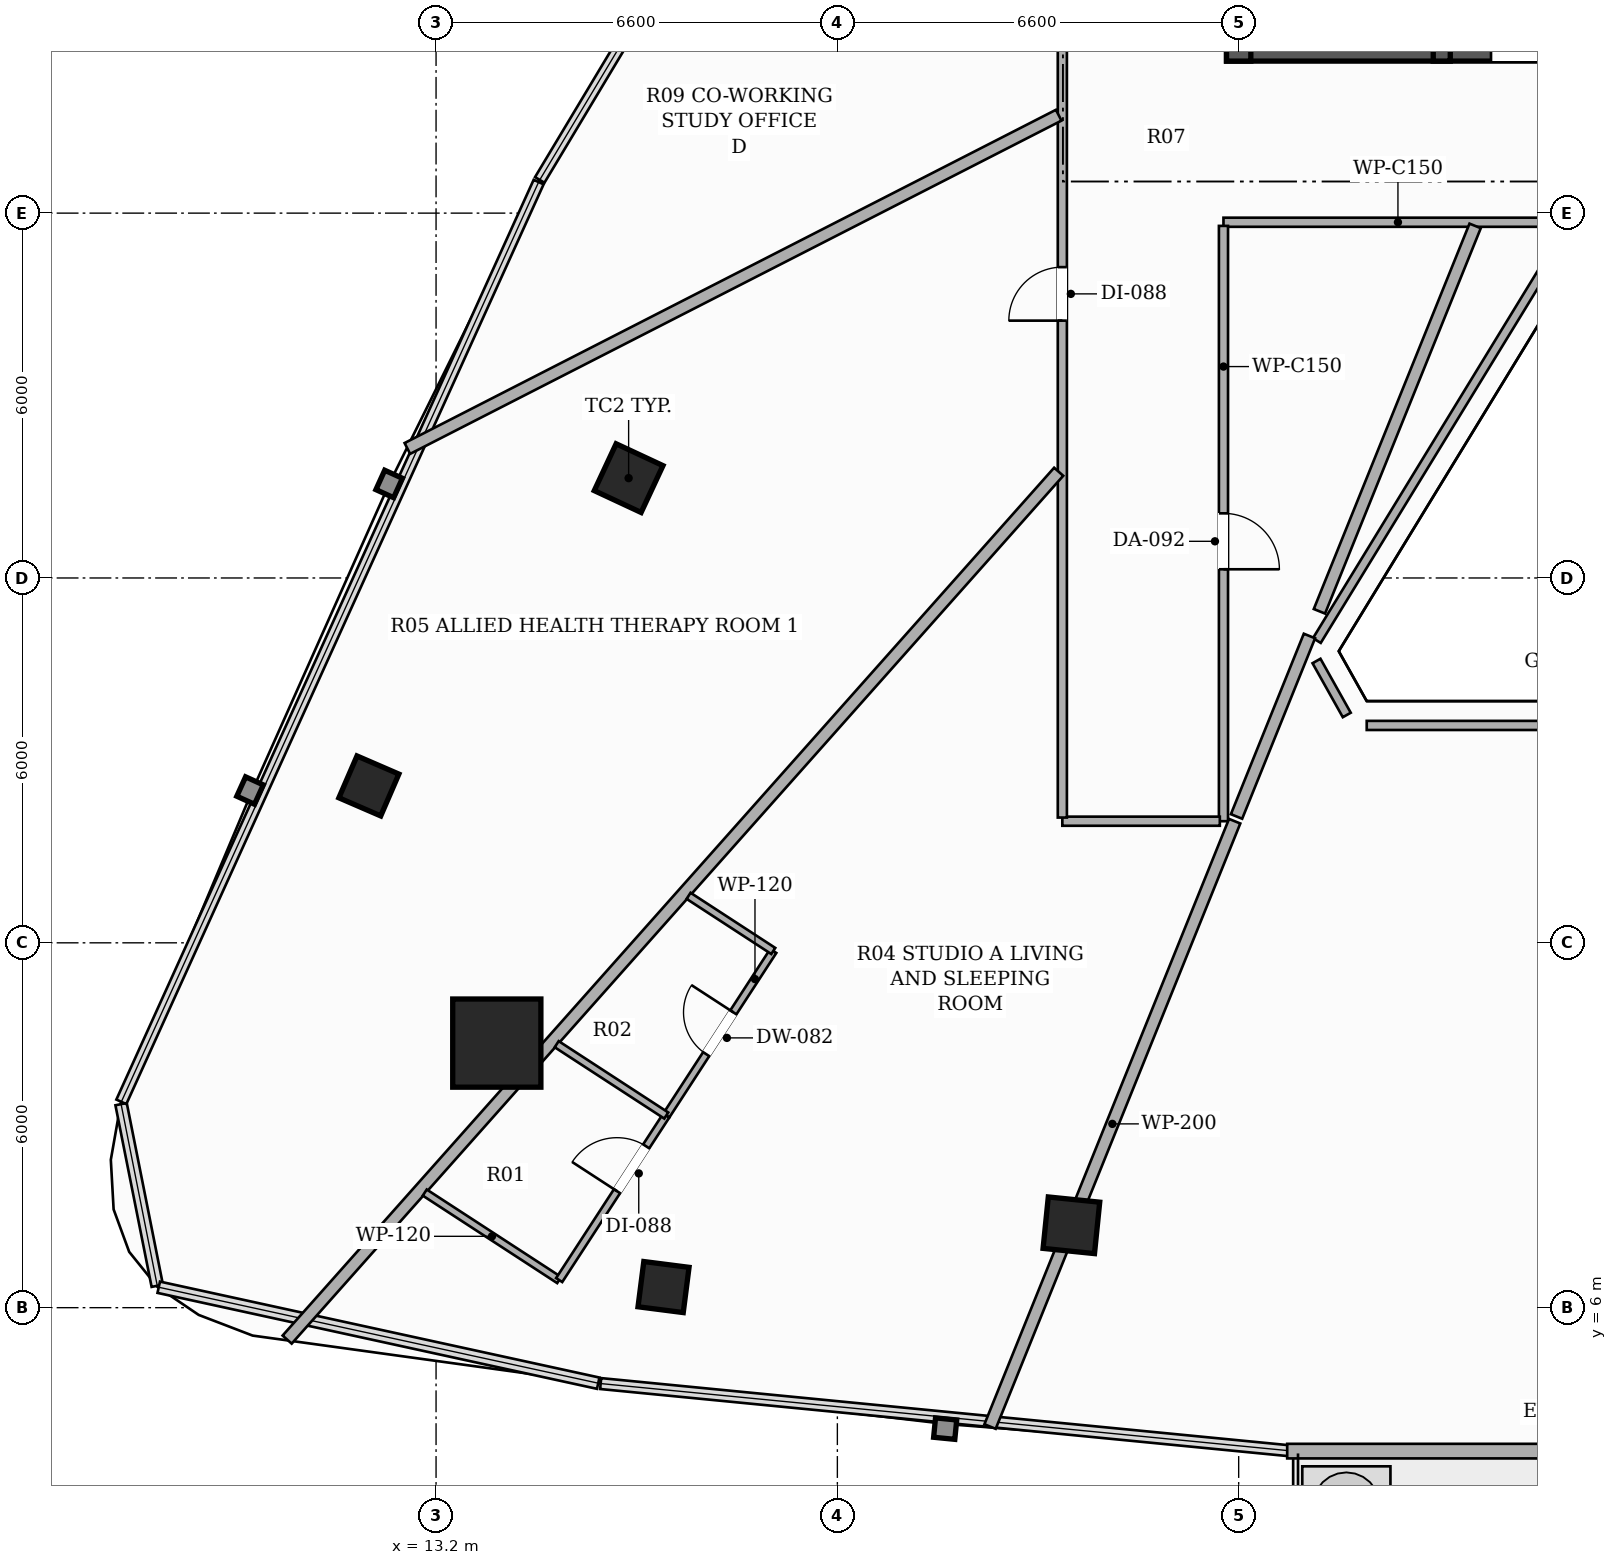
"""IFC4 building model, lengths in metres.
Left out: names, types, materials, properties, quantities, classifications, styles, units other than length and angle.
Written with IfcOpenShell. Run it as: python <this file> out.ifc"""

import sys

from ifc_helpers import new_model, si_unit, direction, frame, frame_2d, origin, origin_2d, place, context, subcontext, project, spatial, rectangle, hollow_rectangle, extrude, element, fill, save


model = new_model("IFC4")
c1 = context("Model", 3, precision=1e-05, world=origin(), true_north=direction((0.0, 1.0)))
c2 = subcontext(c1, "Body", "Model", "MODEL_VIEW")
j1 = project(units=[si_unit("LENGTHUNIT", "METRE"), si_unit("PLANEANGLEUNIT", "RADIAN")], contexts=[c1])
p1 = place(None, origin())
s1 = spatial("IfcSite", under=j1, at=p1, CompositionType="ELEMENT")
p2 = place(p1, origin())
s2 = spatial("IfcBuilding", under=s1, at=p2, CompositionType="ELEMENT")
p3 = place(p2, frame((0.0, 0.0, 153.95)))
s3 = spatial("IfcBuildingStorey", under=s2, at=p3, CompositionType="ELEMENT", Elevation=153.95)
p4 = place(p3, frame((26.2, 26.7, 0.0), z_axis=(0.0, 0.0, 1.0), x_axis=(1.0, 0.0, 0.0)))
e1 = element("IfcWall", 1, at=p4, inside=s3, PredefinedType="SHEAR", context=c2, shape_type="SweptSolid", body=[
    extrude(rectangle(XDim=13.6, YDim=0.4, at=frame_2d((6.8, 0.0))), origin(), (0.0, 0.0, 1.0), 3.3),
])
p5 = place(p4, frame((4.35, 0.0, 0.0)))
e2 = element("IfcOpeningElement", 2, at=p5, cuts=e1, PredefinedType="OPENING", context=c2, shape_type="SweptSolid", body=[
    extrude(rectangle(XDim=1.05, YDim=2.15, at=frame_2d((0.525, 1.075))), frame((0.0, 0.21, 0.0), z_axis=(0.0, -1.0, 0.0), x_axis=(1.0, 0.0, 0.0)), (0.0, 0.0, 1.0), 0.42),
])
p6 = place(p4, frame((8.3, 0.0, 0.0)))
e3 = element("IfcOpeningElement", 3, at=p6, cuts=e1, PredefinedType="OPENING", context=c2, shape_type="SweptSolid", body=[
    extrude(rectangle(XDim=1.05, YDim=2.15, at=frame_2d((0.525, 1.075))), frame((0.0, 0.21, 0.0), z_axis=(0.0, -1.0, 0.0), x_axis=(1.0, 0.0, 0.0)), (0.0, 0.0, 1.0), 0.42),
])
p7 = place(p3, frame((26.4, 26.5, 0.0), z_axis=(0.0, 0.0, 1.0), x_axis=(0.0, 1.0, 0.0)))
e4 = element("IfcWall", 4, at=p7, inside=s3, PredefinedType="SHEAR", context=c2, shape_type="SweptSolid", body=[
    extrude(rectangle(XDim=7.6, YDim=0.4, at=frame_2d((3.8, 0.0))), origin(), (0.0, 0.0, 1.0), 3.3),
])
p8 = place(p3, frame((29.74, 26.5, 0.0), z_axis=(0.0, 0.0, 1.0), x_axis=(0.0, 1.0, 0.0)))
e5 = element("IfcWall", 5, at=p8, inside=s3, PredefinedType="SHEAR", context=c2, shape_type="SweptSolid", body=[
    extrude(rectangle(XDim=8.15, YDim=0.28, at=frame_2d((4.075, 0.0))), origin(), (0.0, 0.0, 1.0), 3.3),
])
p9 = place(p8, frame((0.6, 0.0, 0.0)))
e6 = element("IfcOpeningElement", 6, at=p9, cuts=e5, PredefinedType="OPENING", context=c2, shape_type="SweptSolid", body=[
    extrude(rectangle(XDim=1.05, YDim=2.15, at=frame_2d((0.525, 1.075))), frame((0.0, 0.15, 0.0), z_axis=(0.0, -1.0, 0.0), x_axis=(1.0, 0.0, 0.0)), (0.0, 0.0, 1.0), 0.3),
])
p10 = place(p3, frame((14.199, 10.351, 0.0), z_axis=(0.0, 0.0, 1.0), x_axis=(1.0, 0.0, 0.0)))
e7 = element("IfcColumn", 7, at=p10, inside=s3, PredefinedType="COLUMN", context=c2, shape_type="SweptSolid", body=[
    extrude(hollow_rectangle(XDim=1.45, YDim=1.45, WallThickness=0.045, at=origin_2d()), origin(), (0.0, 0.0, 1.0), 3.3),
])
for number, where, z_axis, x_axis in (
    (8, (16.367, 19.642, 0.0), (0.0, 0.0, 1.0), (0.423, 0.906, 0.0)),
    (9, (23.649, 7.355, 0.0), (0.0, 0.0, 1.0), (-0.995, 0.101, 0.0)),
):
    element("IfcColumn", number, at=place(p3, frame(where, z_axis=z_axis, x_axis=x_axis)), inside=s3, PredefinedType="COLUMN", context=c2, shape_type="SweptSolid", body=[
        extrude(hollow_rectangle(XDim=0.85, YDim=0.85, WallThickness=0.028, at=origin_2d()), origin(), (0.0, 0.0, 1.0), 3.3),
    ])
for number, where, z_axis, x_axis in (
    (10, (12.095, 14.58, 0.0), (0.0, 0.0, 1.0), (0.397, 0.918, 0.0)),
    (11, (16.941, 6.339, 0.0), (0.0, 0.0, 1.0), (-0.992, 0.127, 0.0)),
):
    element("IfcColumn", number, at=place(p3, frame(where, z_axis=z_axis, x_axis=x_axis)), inside=s3, PredefinedType="COLUMN", context=c2, shape_type="SweptSolid", body=[
        extrude(hollow_rectangle(XDim=0.75, YDim=0.75, WallThickness=0.025, at=origin_2d()), origin(), (0.0, 0.0, 1.0), 3.3),
    ])
p11 = place(p3, frame((27.198, 3.641, 0.0), z_axis=(0.0, 0.0, 1.0), x_axis=(1.0, 0.0, 0.0)))
e12 = element("IfcWall", 12, at=p11, inside=s3, PredefinedType="SOLIDWALL", context=c2, shape_type="SweptSolid", body=[
    extrude(rectangle(XDim=11.604, YDim=0.24, at=frame_2d((5.802, 0.0))), origin(), (0.0, 0.0, 1.0), 2.624),
])
p12 = place(p11, frame((9.107, 0.0, 0.0)))
e13 = element("IfcOpeningElement", 13, at=p12, cuts=e12, PredefinedType="OPENING", context=c2, shape_type="SweptSolid", body=[
    extrude(rectangle(XDim=1.8, YDim=2.2, at=frame_2d((0.9, 1.1))), frame((0.0, 0.13, 0.0), z_axis=(0.0, -1.0, 0.0), x_axis=(1.0, 0.0, 0.0)), (0.0, 0.0, 1.0), 0.26),
])
p13 = place(p3, frame((31.889, 23.85, 0.0), z_axis=(0.0, 0.0, 1.0), x_axis=(-1.0, 0.0, 0.0)))
e14 = element("IfcWall", 14, at=p13, inside=s3, PredefinedType="PARTITIONING", context=c2, shape_type="SweptSolid", body=[
    extrude(rectangle(XDim=5.739, YDim=0.15, at=frame_2d((2.87, 0.0))), origin(), (0.0, 0.0, 1.0), 2.721),
])
p14 = place(p3, frame((26.15, 23.79, 0.0), z_axis=(0.0, 0.0, 1.0), x_axis=(0.0, -1.0, 0.0)))
e15 = element("IfcWall", 15, at=p14, inside=s3, PredefinedType="PARTITIONING", context=c2, shape_type="SweptSolid", body=[
    extrude(rectangle(XDim=9.79, YDim=0.15, at=frame_2d((4.895, 0.0))), origin(), (0.0, 0.0, 1.0), 2.721),
])
p15 = place(p14, frame((4.727, 0.0, 0.0)))
e16 = element("IfcOpeningElement", 16, at=p15, cuts=e15, PredefinedType="OPENING", context=c2, shape_type="SweptSolid", body=[
    extrude(rectangle(XDim=0.92, YDim=2.15, at=frame_2d((0.46, 1.075))), frame((0.0, 0.085, 0.0), z_axis=(0.0, -1.0, 0.0), x_axis=(1.0, 0.0, 0.0)), (0.0, 0.0, 1.0), 0.17),
])
p16 = place(p3, frame((26.09, 14.0, 0.0), z_axis=(0.0, 0.0, 1.0), x_axis=(-1.0, 0.0, 0.0)))
e17 = element("IfcWall", 17, at=p16, inside=s3, PredefinedType="PARTITIONING", context=c2, shape_type="SweptSolid", body=[
    extrude(rectangle(XDim=2.59, YDim=0.15, at=frame_2d((1.295, 0.0))), origin(), (0.0, 0.0, 1.0), 2.721),
])
p17 = place(p3, frame((23.5, 14.06, 0.0), z_axis=(0.0, 0.0, 1.0), x_axis=(0.0, 1.0, 0.0)))
e18 = element("IfcWall", 18, at=p17, inside=s3, PredefinedType="PARTITIONING", context=c2, shape_type="SweptSolid", body=[
    extrude(rectangle(XDim=22.84, YDim=0.15, at=frame_2d((11.42, 0.0))), origin(), (0.0, 0.0, 1.0), 2.413),
])
p18 = place(p17, frame((8.172, 0.0, 0.0)))
e19 = element("IfcOpeningElement", 19, at=p18, cuts=e18, PredefinedType="OPENING", context=c2, shape_type="SweptSolid", body=[
    extrude(rectangle(XDim=0.88, YDim=2.1, at=frame_2d((0.44, 1.05))), frame((0.0, 0.085, 0.0), z_axis=(0.0, -1.0, 0.0), x_axis=(1.0, 0.0, 0.0)), (0.0, 0.0, 1.0), 0.17),
])
p19 = place(p17, frame((20.969, 0.0, 0.0)))
e20 = element("IfcOpeningElement", 20, at=p19, cuts=e18, PredefinedType="OPENING", context=c2, shape_type="SweptSolid", body=[
    extrude(rectangle(XDim=0.88, YDim=2.1, at=frame_2d((0.44, 1.05))), frame((0.0, 0.085, 0.0), z_axis=(0.0, -1.0, 0.0), x_axis=(1.0, 0.0, 0.0)), (0.0, 0.0, 1.0), 0.17),
])
p20 = place(p17, frame((15.484, 0.0, 0.0)))
e21 = element("IfcOpeningElement", 21, at=p20, cuts=e18, PredefinedType="OPENING", context=c2, shape_type="SweptSolid", body=[
    extrude(rectangle(XDim=0.88, YDim=2.1, at=frame_2d((0.44, 1.05))), frame((0.0, 0.085, 0.0), z_axis=(0.0, -1.0, 0.0), x_axis=(1.0, 0.0, 0.0)), (0.0, 0.0, 1.0), 0.17),
])
p21 = place(p3, frame((37.493, 15.575, 0.0), z_axis=(0.0, 0.0, 1.0), x_axis=(-1.0, 0.0, 0.0)))
e22 = element("IfcWall", 22, at=p21, inside=s3, PredefinedType="PARTITIONING", context=c2, shape_type="SweptSolid", body=[
    extrude(rectangle(XDim=8.987, YDim=0.15, at=frame_2d((4.493, 0.0))), origin(), (0.0, 0.0, 1.0), 2.721),
])
p22 = place(p3, frame((28.178, 15.747, 0.0), z_axis=(0.0, 0.0, 1.0), x_axis=(-0.489202035948, 0.872170492521, 0.0)))
e23 = element("IfcWall", 23, at=p22, inside=s3, PredefinedType="PARTITIONING", context=c2, shape_type="SweptSolid", body=[
    extrude(rectangle(XDim=1.018, YDim=0.15, at=frame_2d((0.509, 0.0))), origin(), (0.0, 0.0, 1.0), 3.06),
])
p23 = place(p3, frame((27.686, 16.971, 0.0), z_axis=(0.0, 0.0, 1.0), x_axis=(0.521873666917, 0.853022787374, 0.0)))
e24 = element("IfcWall", 24, at=p23, inside=s3, PredefinedType="PARTITIONING", context=c2, shape_type="SweptSolid", body=[
    extrude(rectangle(XDim=7.994, YDim=0.15, at=frame_2d((3.997, 0.0))), origin(), (0.0, 0.0, 1.0), 2.721),
])
p24 = place(p3, frame((22.311, 4.045, 0.0), z_axis=(0.0, 0.0, 1.0), x_axis=(0.374673572515, 0.92715679044, 0.0)))
e25 = element("IfcWall", 25, at=p24, inside=s3, PredefinedType="PARTITIONING", context=c2, shape_type="SweptSolid", body=[
    extrude(rectangle(XDim=10.737, YDim=0.2, at=frame_2d((5.369, 0.0))), origin(), (0.0, 0.0, 1.0), 2.413),
])
p25 = place(p3, frame((26.365, 14.078, 0.0), z_axis=(0.0, 0.0, 1.0), x_axis=(0.374557626207, 0.927203637099, 0.0)))
e26 = element("IfcWall", 26, at=p25, inside=s3, PredefinedType="PARTITIONING", context=c2, shape_type="SweptSolid", body=[
    extrude(rectangle(XDim=3.201, YDim=0.2, at=frame_2d((1.601, 0.0))), origin(), (0.0, 0.0, 1.0), 3.06),
])
p26 = place(p3, frame((27.728, 17.452, 0.0), z_axis=(0.0, 0.0, 1.0), x_axis=(0.374639602714, 0.927170517261, 0.0)))
e27 = element("IfcWall", 27, at=p26, inside=s3, PredefinedType="PARTITIONING", context=c2, shape_type="SweptSolid", body=[
    extrude(rectangle(XDim=6.836, YDim=0.2, at=frame_2d((3.418, 0.0))), origin(), (0.0, 0.0, 1.0), 2.721),
])
p27 = place(p3, frame((23.44, 19.747, 0.0), z_axis=(0.0, 0.0, 1.0), x_axis=(-0.664444771995, -0.747337370248, 0.0)))
e28 = element("IfcWall", 28, at=p27, inside=s3, PredefinedType="PARTITIONING", context=c2, shape_type="SweptSolid", body=[
    extrude(rectangle(XDim=19.097, YDim=0.2, at=frame_2d((9.549, 0.0))), origin(), (0.0, 0.0, 1.0), 2.413),
])
p28 = place(p3, frame((12.728, 20.13, 0.0), z_axis=(0.0, 0.0, 1.0), x_axis=(0.890257920911, 0.455456731486, 0.0)))
e29 = element("IfcWall", 29, at=p28, inside=s3, PredefinedType="PARTITIONING", context=c2, shape_type="SweptSolid", body=[
    extrude(rectangle(XDim=12.032, YDim=0.2, at=frame_2d((6.016, 0.0))), origin(), (0.0, 0.0, 1.0), 2.413),
])
p29 = place(p3, frame((16.986, 9.16, 0.0), z_axis=(0.0, 0.0, 1.0), x_axis=(0.545222266406, 0.8382915246, 0.0)))
e30 = element("IfcWall", 30, at=p29, inside=s3, PredefinedType="PARTITIONING", context=c2, shape_type="SweptSolid", body=[
    extrude(rectangle(XDim=3.228, YDim=0.12, at=frame_2d((1.614, 0.0))), origin(), (0.0, 0.0, 1.0), 3.06),
])
p30 = place(p29, frame((1.204, 0.0, 0.0)))
e31 = element("IfcOpeningElement", 31, at=p30, cuts=e30, PredefinedType="OPENING", context=c2, shape_type="SweptSolid", body=[
    extrude(rectangle(XDim=0.82, YDim=2.1, at=frame_2d((0.41, 1.05))), frame((0.0, 0.07, 0.0), z_axis=(0.0, -1.0, 0.0), x_axis=(1.0, 0.0, 0.0)), (0.0, 0.0, 1.0), 0.14),
])
p31 = place(p3, frame((18.746, 11.866, 0.0), z_axis=(0.0, 0.0, 1.0), x_axis=(-0.838034005253, 0.545618003771, 0.0)))
e32 = element("IfcWall", 32, at=p31, inside=s3, PredefinedType="PARTITIONING", context=c2, shape_type="SweptSolid", body=[
    extrude(rectangle(XDim=1.662, YDim=0.12, at=frame_2d((0.831, 0.0))), origin(), (0.0, 0.0, 1.0), 3.06),
])
p32 = place(p3, frame((13.014, 7.893, 0.0), z_axis=(0.0, 0.0, 1.0), x_axis=(0.838149605573, -0.545440407999, 0.0)))
e33 = element("IfcWall", 33, at=p32, inside=s3, PredefinedType="PARTITIONING", context=c2, shape_type="SweptSolid", body=[
    extrude(rectangle(XDim=2.638, YDim=0.12, at=frame_2d((1.319, 0.0))), origin(), (0.0, 0.0, 1.0), 3.06),
])
p33 = place(p3, frame((15.225, 6.454, 0.0), z_axis=(0.0, 0.0, 1.0), x_axis=(0.54546937792, 0.838130752181, 0.0)))
e34 = element("IfcWall", 34, at=p33, inside=s3, PredefinedType="PARTITIONING", context=c2, shape_type="SweptSolid", body=[
    extrude(rectangle(XDim=3.228, YDim=0.12, at=frame_2d((1.614, 0.0))), origin(), (0.0, 0.0, 1.0), 2.413),
])
p34 = place(p33, frame((1.744, 0.0, 0.0)))
e35 = element("IfcOpeningElement", 35, at=p34, cuts=e34, PredefinedType="OPENING", context=c2, shape_type="SweptSolid", body=[
    extrude(rectangle(XDim=0.88, YDim=2.1, at=frame_2d((0.44, 1.05))), frame((0.0, 0.07, 0.0), z_axis=(0.0, -1.0, 0.0), x_axis=(1.0, 0.0, 0.0)), (0.0, 0.0, 1.0), 0.14),
])
p35 = place(p3, frame((16.986, 9.16, 0.0), z_axis=(0.0, 0.0, 1.0), x_axis=(-0.838062073647, 0.545574890106, 0.0)))
e36 = element("IfcWall", 36, at=p35, inside=s3, PredefinedType="PARTITIONING", context=c2, shape_type="SweptSolid", body=[
    extrude(rectangle(XDim=2.15, YDim=0.12, at=frame_2d((1.075, 0.0))), origin(), (0.0, 0.0, 1.0), 3.06),
])
p36 = place(p18, origin())
e37 = element("IfcDoor", 37, at=p36, inside=s3, OperationType="SINGLE_SWING_LEFT", PredefinedType="DOOR", context=c2, shape_type="SweptSolid", body=[
    extrude(rectangle(XDim=0.88, YDim=2.1, at=frame_2d((0.44, 1.05))), frame((0.0, 0.025, 0.0), z_axis=(0.0, -1.0, 0.0), x_axis=(1.0, 0.0, 0.0)), (0.0, 0.0, 1.0), 0.05),
])
fill(e19, e37)
p37 = place(p15, origin())
e38 = element("IfcDoor", 38, at=p37, inside=s3, OperationType="SINGLE_SWING_RIGHT", PredefinedType="DOOR", context=c2, shape_type="SweptSolid", body=[
    extrude(rectangle(XDim=0.92, YDim=2.15, at=frame_2d((0.46, 1.075))), frame((0.0, 0.025, 0.0), z_axis=(0.0, -1.0, 0.0), x_axis=(1.0, 0.0, 0.0)), (0.0, 0.0, 1.0), 0.05),
])
fill(e16, e38)
p38 = place(p30, origin())
e39 = element("IfcDoor", 39, at=p38, inside=s3, OperationType="SINGLE_SWING_RIGHT", PredefinedType="DOOR", context=c2, shape_type="SweptSolid", body=[
    extrude(rectangle(XDim=0.82, YDim=2.1, at=frame_2d((0.41, 1.05))), frame((0.0, 0.025, 0.0), z_axis=(0.0, -1.0, 0.0), x_axis=(1.0, 0.0, 0.0)), (0.0, 0.0, 1.0), 0.05),
])
fill(e31, e39)
p39 = place(p34, origin())
e40 = element("IfcDoor", 40, at=p39, inside=s3, OperationType="SINGLE_SWING_LEFT", PredefinedType="DOOR", context=c2, shape_type="SweptSolid", body=[
    extrude(rectangle(XDim=0.88, YDim=2.1, at=frame_2d((0.44, 1.05))), frame((0.0, 0.025, 0.0), z_axis=(0.0, -1.0, 0.0), x_axis=(1.0, 0.0, 0.0)), (0.0, 0.0, 1.0), 0.05),
])
fill(e35, e40)
save(model, sys.argv[1])
